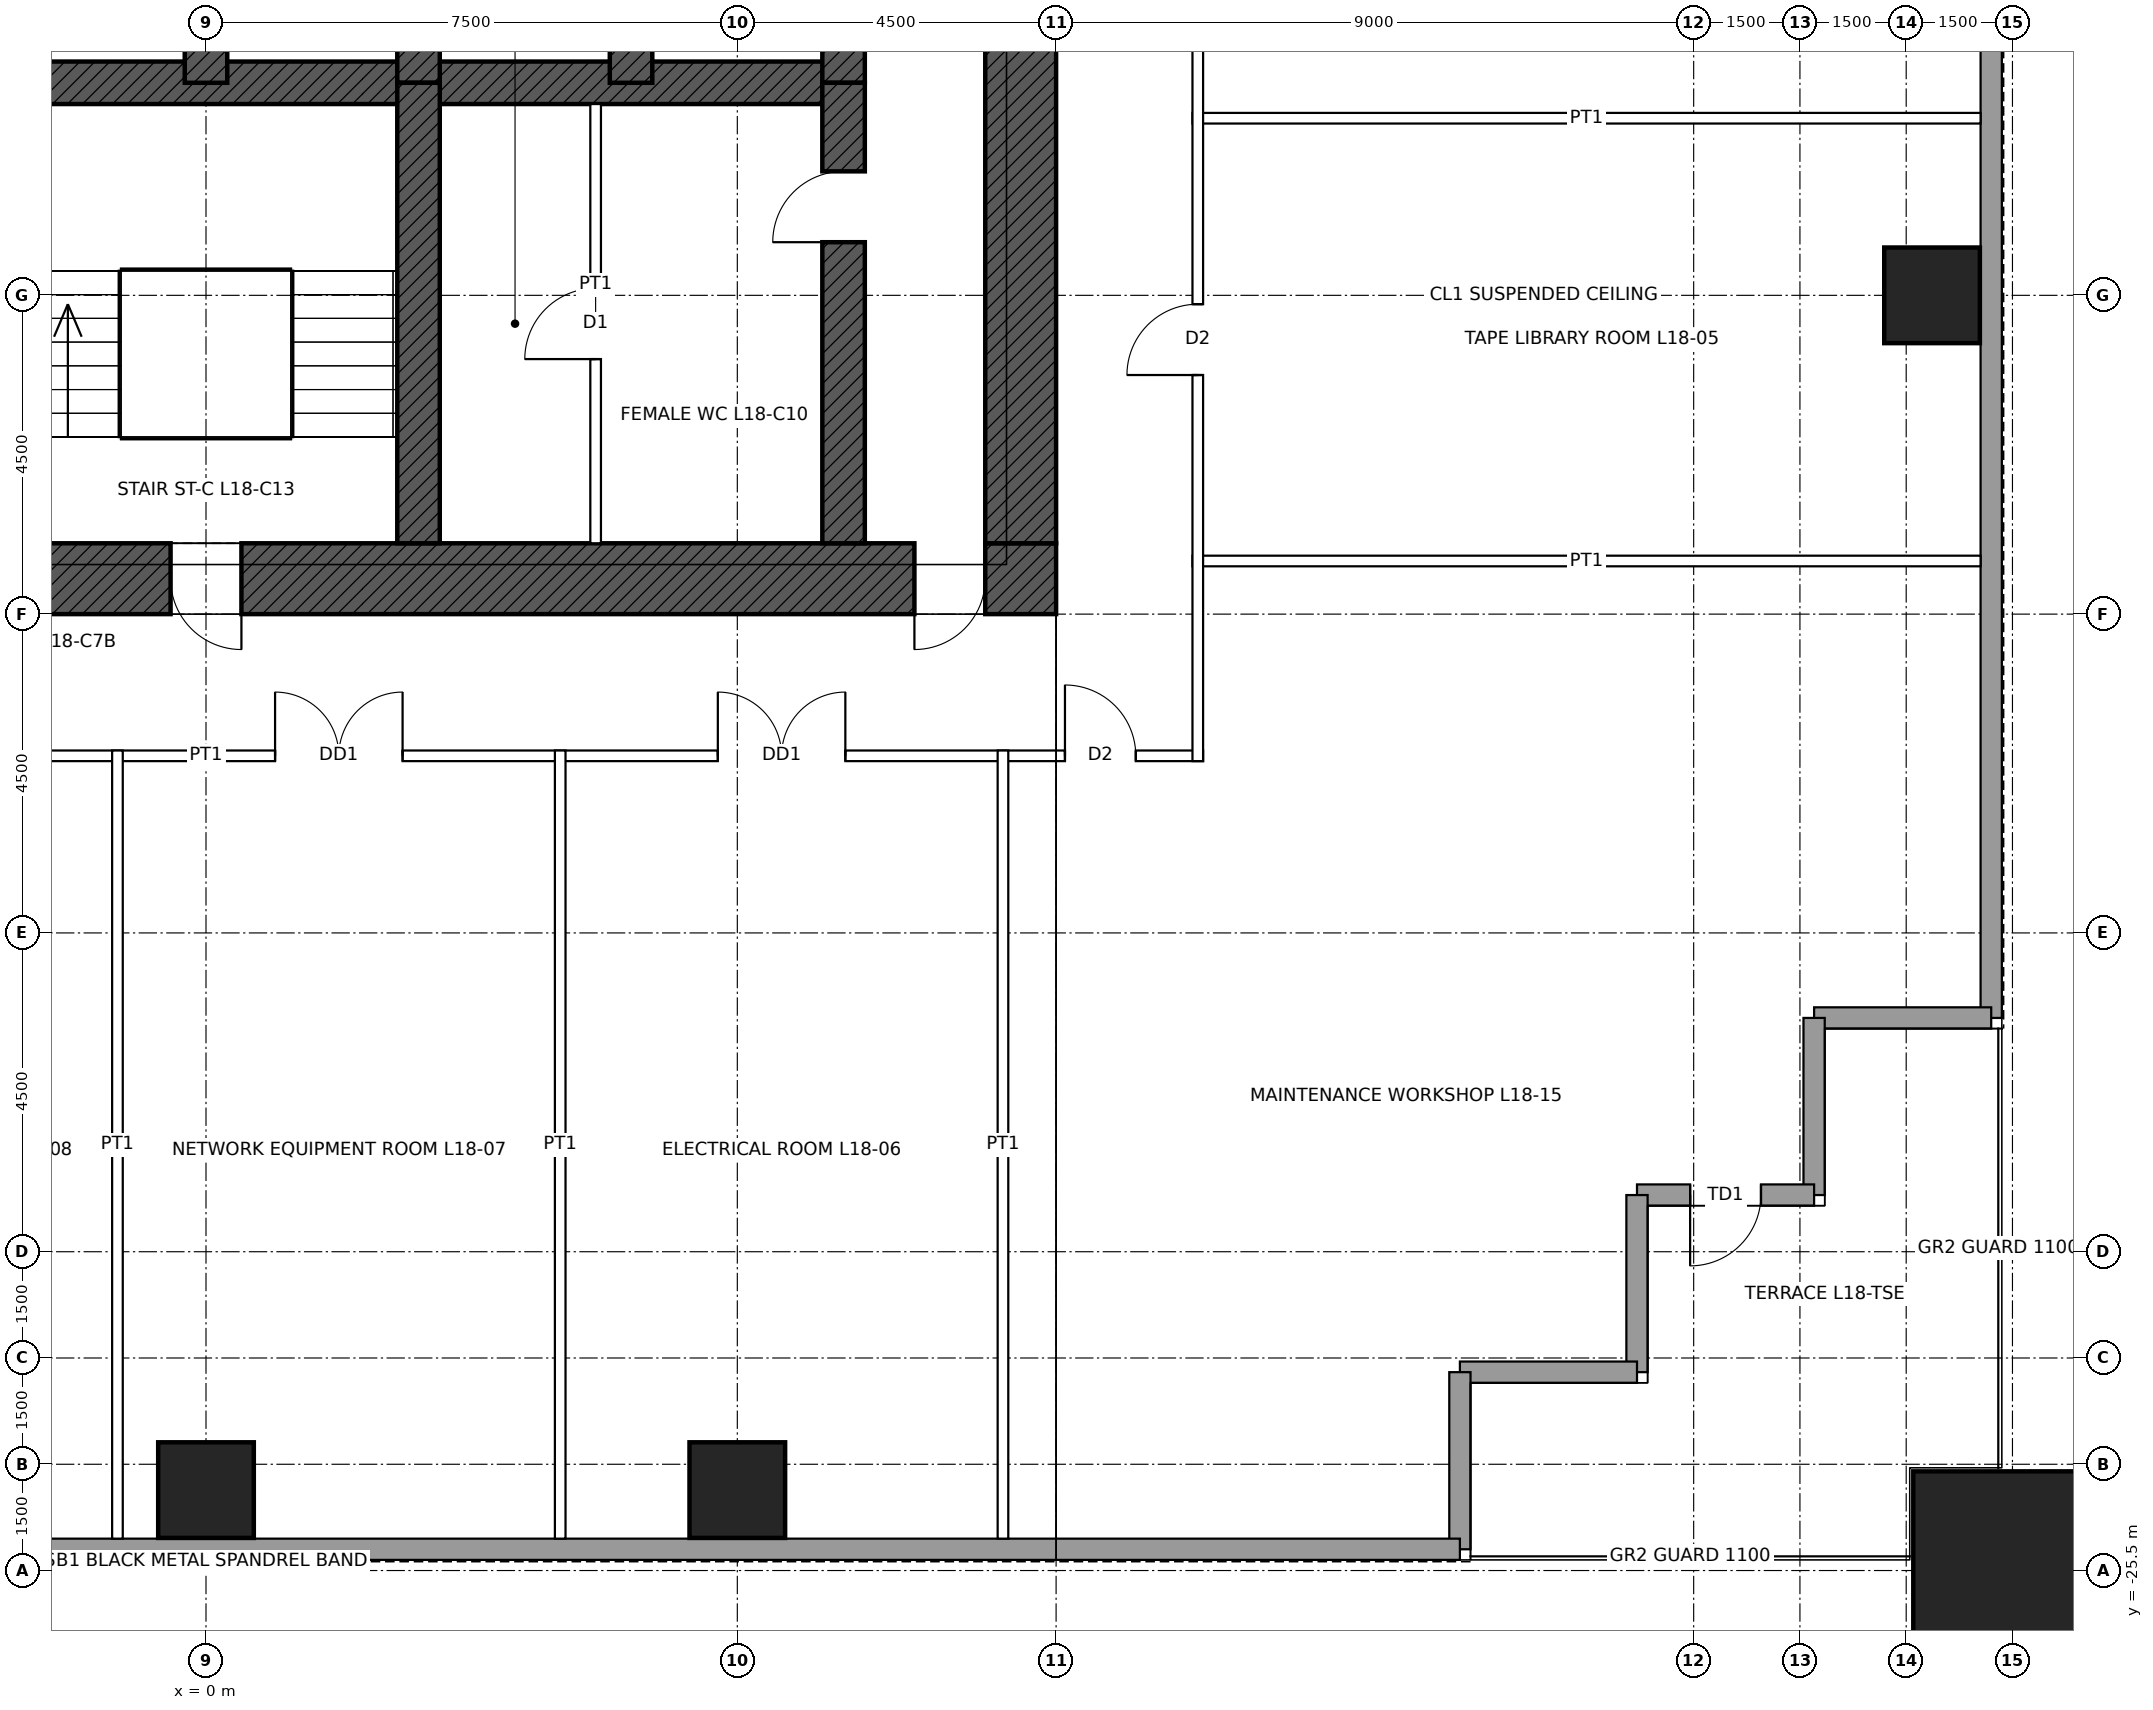
"""IFC4 building model, lengths in metres.
Left out: names, types, materials, properties, quantities, classifications, styles, units other than length and angle.
Written with IfcOpenShell. Run it as: python <this file> out.ifc"""

import sys

from ifc_helpers import new_model, si_unit, direction, frame, frame_2d, origin, origin_2d, place, context, subcontext, project, spatial, rectangle, hollow_rectangle, extrude, element, fill, save


model = new_model("IFC4")
c1 = context("Model", 3, precision=1e-05, world=origin(), true_north=direction((0.0, 1.0)))
c2 = subcontext(c1, "Body", "Model", "MODEL_VIEW")
j1 = project(units=[si_unit("LENGTHUNIT", "METRE"), si_unit("PLANEANGLEUNIT", "RADIAN")], contexts=[c1])
p1 = place(None, origin())
s1 = spatial("IfcSite", under=j1, at=p1, CompositionType="ELEMENT")
p2 = place(p1, origin())
s2 = spatial("IfcBuilding", under=s1, at=p2, CompositionType="ELEMENT")
p3 = place(p2, frame((0.0, 0.0, 93.4)))
s3 = spatial("IfcBuildingStorey", under=s2, at=p3, CompositionType="ELEMENT", Elevation=93.4)
p4 = place(p3, frame((25.5, -25.5, 0.0), z_axis=(0.0, 0.0, 1.0), x_axis=(1.0, 0.0, 0.0)))
e1 = element("IfcColumn", 1, at=p4, inside=s3, PredefinedType="COLUMN", context=c2, shape_type="SweptSolid", body=[
    extrude(hollow_rectangle(XDim=2.8, YDim=2.8, WallThickness=0.14, at=origin_2d()), origin(), (0.0, 0.0, 1.0), 5.0),
])
for number, where, z_axis, x_axis in (
    (2, (24.365, -7.5, 0.0), (0.0, 0.0, 1.0), (1.0, 0.0, 0.0)),
    (3, (7.5, -24.365, 0.0), (0.0, 0.0, 1.0), (1.0, 0.0, 0.0)),
    (4, (0.0, -24.365, 0.0), (0.0, 0.0, 1.0), (1.0, 0.0, 0.0)),
):
    element("IfcColumn", number, at=place(p3, frame(where, z_axis=z_axis, x_axis=x_axis)), inside=s3, PredefinedType="COLUMN", context=c2, shape_type="SweptSolid", body=[
        extrude(hollow_rectangle(XDim=1.35, YDim=1.35, WallThickness=0.1, at=origin_2d()), origin(), (0.0, 0.0, 1.0), 5.0),
    ])
p5 = place(p3, frame((12.0, -11.5, 0.0), z_axis=(0.0, 0.0, 1.0), x_axis=(-1.0, 0.0, 0.0)))
e5 = element("IfcWall", 5, at=p5, inside=s3, PredefinedType="SHEAR", context=c2, shape_type="SweptSolid", body=[
    extrude(rectangle(XDim=24.0, YDim=1.0, at=frame_2d((12.0, 0.0))), origin(), (0.0, 0.0, 1.0), 5.0),
])
p6 = place(p5, frame((11.5, 0.0, 0.0)))
e6 = element("IfcOpeningElement", 6, at=p6, cuts=e5, PredefinedType="OPENING", context=c2, shape_type="SweptSolid", body=[
    extrude(rectangle(XDim=1.0, YDim=2.1, at=frame_2d((0.5, 1.05))), frame((0.0, 0.51, 0.0), z_axis=(0.0, -1.0, 0.0), x_axis=(1.0, 0.0, 0.0)), (0.0, 0.0, 1.0), 1.02),
])
p7 = place(p5, frame((1.0, 0.0, 0.0)))
e7 = element("IfcOpeningElement", 7, at=p7, cuts=e5, PredefinedType="OPENING", context=c2, shape_type="SweptSolid", body=[
    extrude(rectangle(XDim=1.0, YDim=2.4, at=frame_2d((0.5, 1.2))), frame((0.0, 0.51, 0.0), z_axis=(0.0, -1.0, 0.0), x_axis=(1.0, 0.0, 0.0)), (0.0, 0.0, 1.0), 1.02),
])
p8 = place(p3, frame((11.5, 11.0, 0.0), z_axis=(0.0, 0.0, 1.0), x_axis=(0.0, -1.0, 0.0)))
e8 = element("IfcWall", 8, at=p8, inside=s3, PredefinedType="SHEAR", context=c2, shape_type="SweptSolid", body=[
    extrude(rectangle(XDim=22.0, YDim=1.0, at=frame_2d((11.0, 0.0))), origin(), (0.0, 0.0, 1.0), 5.0),
])
p9 = place(p8, frame((10.5, 0.0, 0.0)))
e9 = element("IfcOpeningElement", 9, at=p9, cuts=e8, PredefinedType="OPENING", context=c2, shape_type="SweptSolid", body=[
    extrude(rectangle(XDim=1.0, YDim=2.4, at=frame_2d((0.5, 1.2))), frame((0.0, 0.51, 0.0), z_axis=(0.0, -1.0, 0.0), x_axis=(1.0, 0.0, 0.0)), (0.0, 0.0, 1.0), 1.02),
])
p10 = place(p3, frame((-9.0, -4.5, 0.0), z_axis=(0.0, 0.0, 1.0), x_axis=(1.0, 0.0, 0.0)))
e10 = element("IfcWall", 10, at=p10, inside=s3, PredefinedType="SHEAR", context=c2, shape_type="SweptSolid", body=[
    extrude(rectangle(XDim=18.0, YDim=0.6, at=frame_2d((9.0, 0.0))), origin(), (0.0, 0.0, 1.0), 5.0),
])
for number, where, z_axis, x_axis in (
    (11, (9.0, -4.5, 0.0), (0.0, 0.0, 1.0), (0.0, 1.0, 0.0)),
    (12, (0.0, -4.5, 0.0), (0.0, 0.0, 1.0), (0.0, 1.0, 0.0)),
    (13, (3.0, -4.5, 0.0), (0.0, 0.0, 1.0), (0.0, 1.0, 0.0)),
    (14, (6.0, -4.5, 0.0), (0.0, 0.0, 1.0), (0.0, 1.0, 0.0)),
):
    element("IfcWall", number, at=place(p3, frame(where, z_axis=z_axis, x_axis=x_axis)), inside=s3, PredefinedType="SHEAR", context=c2, shape_type="SweptSolid", body=[
        extrude(rectangle(XDim=3.0, YDim=0.6, at=frame_2d((1.5, 0.0))), origin(), (0.0, 0.0, 1.0), 5.0),
    ])
p11 = place(p3, frame((9.0, -11.0, 0.0), z_axis=(0.0, 0.0, 1.0), x_axis=(0.0, 1.0, 0.0)))
e15 = element("IfcWall", 15, at=p11, inside=s3, PredefinedType="SHEAR", context=c2, shape_type="SweptSolid", body=[
    extrude(rectangle(XDim=6.5, YDim=0.6, at=frame_2d((3.25, 0.0))), origin(), (0.0, 0.0, 1.0), 5.0),
])
p12 = place(p11, frame((4.25, 0.0, 0.0)))
e16 = element("IfcOpeningElement", 16, at=p12, cuts=e15, PredefinedType="OPENING", context=c2, shape_type="SweptSolid", body=[
    extrude(rectangle(XDim=1.0, YDim=2.1, at=frame_2d((0.5, 1.05))), frame((0.0, 0.31, 0.0), z_axis=(0.0, -1.0, 0.0), x_axis=(1.0, 0.0, 0.0)), (0.0, 0.0, 1.0), 0.62),
])
p13 = place(p3, frame((3.0, -11.0, 0.0), z_axis=(0.0, 0.0, 1.0), x_axis=(0.0, 1.0, 0.0)))
e17 = element("IfcWall", 17, at=p13, inside=s3, PredefinedType="SHEAR", context=c2, shape_type="SweptSolid", body=[
    extrude(rectangle(XDim=6.5, YDim=0.6, at=frame_2d((3.25, 0.0))), origin(), (0.0, 0.0, 1.0), 5.0),
])
p14 = place(p3, frame((25.2, 17.7, 0.0), z_axis=(0.0, 0.0, 1.0), x_axis=(0.0, -1.0, 0.0)))
e18 = element("IfcWall", 18, at=p14, inside=s3, PredefinedType="SOLIDWALL", context=c2, shape_type="SweptSolid", body=[
    extrude(rectangle(XDim=35.4, YDim=0.3, at=frame_2d((17.7, 0.0))), origin(), (0.0, 0.0, 1.0), 4.75),
])
for number, where, z_axis, x_axis in (
    (19, (25.2, -17.7, 0.0), (0.0, 0.0, 1.0), (-1.0, 0.0, 0.0)),
    (20, (22.7, -17.7, 0.0), (0.0, 0.0, 1.0), (0.0, -1.0, 0.0)),
):
    element("IfcWall", number, at=place(p3, frame(where, z_axis=z_axis, x_axis=x_axis)), inside=s3, PredefinedType="SOLIDWALL", context=c2, shape_type="SweptSolid", body=[
        extrude(rectangle(XDim=2.5, YDim=0.3, at=frame_2d((1.25, 0.0))), origin(), (0.0, 0.0, 1.0), 4.75),
    ])
p15 = place(p3, frame((22.7, -20.2, 0.0), z_axis=(0.0, 0.0, 1.0), x_axis=(-1.0, 0.0, 0.0)))
e21 = element("IfcWall", 21, at=p15, inside=s3, PredefinedType="SOLIDWALL", context=c2, shape_type="SweptSolid", body=[
    extrude(rectangle(XDim=2.5, YDim=0.3, at=frame_2d((1.25, 0.0))), origin(), (0.0, 0.0, 1.0), 4.75),
])
p16 = place(p15, frame((0.75, 0.0, 0.0)))
e22 = element("IfcOpeningElement", 22, at=p16, cuts=e21, PredefinedType="OPENING", context=c2, shape_type="SweptSolid", body=[
    extrude(rectangle(XDim=1.0, YDim=2.4, at=frame_2d((0.5, 1.2))), frame((0.0, 0.16, 0.0), z_axis=(0.0, -1.0, 0.0), x_axis=(1.0, 0.0, 0.0)), (0.0, 0.0, 1.0), 0.32),
])
for number, where, z_axis, x_axis in (
    (23, (20.2, -20.2, 0.0), (0.0, 0.0, 1.0), (0.0, -1.0, 0.0)),
    (24, (20.2, -22.7, 0.0), (0.0, 0.0, 1.0), (-1.0, 0.0, 0.0)),
    (25, (17.7, -22.7, 0.0), (0.0, 0.0, 1.0), (0.0, -1.0, 0.0)),
):
    element("IfcWall", number, at=place(p3, frame(where, z_axis=z_axis, x_axis=x_axis)), inside=s3, PredefinedType="SOLIDWALL", context=c2, shape_type="SweptSolid", body=[
        extrude(rectangle(XDim=2.5, YDim=0.3, at=frame_2d((1.25, 0.0))), origin(), (0.0, 0.0, 1.0), 4.75),
    ])
p17 = place(p3, frame((17.7, -25.2, 0.0), z_axis=(0.0, 0.0, 1.0), x_axis=(-1.0, 0.0, 0.0)))
e26 = element("IfcWall", 26, at=p17, inside=s3, PredefinedType="SOLIDWALL", context=c2, shape_type="SweptSolid", body=[
    extrude(rectangle(XDim=35.4, YDim=0.3, at=frame_2d((17.7, 0.0))), origin(), (0.0, 0.0, 1.0), 4.75),
])
p18 = place(p3, frame((-14.075, -14.0, 0.0), z_axis=(0.0, 0.0, 1.0), x_axis=(1.0, 0.0, 0.0)))
e27 = element("IfcWall", 27, at=p18, inside=s3, PredefinedType="PARTITIONING", context=c2, shape_type="SweptSolid", body=[
    extrude(rectangle(XDim=28.15, YDim=0.15, at=frame_2d((14.075, 0.0))), origin(), (0.0, 0.0, 1.0), 4.75),
])
p19 = place(p18, frame((21.3, 0.0, 0.0)))
e28 = element("IfcOpeningElement", 28, at=p19, cuts=e27, PredefinedType="OPENING", context=c2, shape_type="SweptSolid", body=[
    extrude(rectangle(XDim=1.8, YDim=2.4, at=frame_2d((0.9, 1.2))), frame((0.0, 0.085, 0.0), z_axis=(0.0, -1.0, 0.0), x_axis=(1.0, 0.0, 0.0)), (0.0, 0.0, 1.0), 0.17),
])
p20 = place(p18, frame((15.05, 0.0, 0.0)))
e29 = element("IfcOpeningElement", 29, at=p20, cuts=e27, PredefinedType="OPENING", context=c2, shape_type="SweptSolid", body=[
    extrude(rectangle(XDim=1.8, YDim=2.4, at=frame_2d((0.9, 1.2))), frame((0.0, 0.085, 0.0), z_axis=(0.0, -1.0, 0.0), x_axis=(1.0, 0.0, 0.0)), (0.0, 0.0, 1.0), 0.17),
])
p21 = place(p18, frame((9.825, 0.0, 0.0)))
e30 = element("IfcOpeningElement", 30, at=p21, cuts=e27, PredefinedType="OPENING", context=c2, shape_type="SweptSolid", body=[
    extrude(rectangle(XDim=1.0, YDim=2.1, at=frame_2d((0.5, 1.05))), frame((0.0, 0.085, 0.0), z_axis=(0.0, -1.0, 0.0), x_axis=(1.0, 0.0, 0.0)), (0.0, 0.0, 1.0), 0.17),
])
p22 = place(p18, frame((4.825, 0.0, 0.0)))
e31 = element("IfcOpeningElement", 31, at=p22, cuts=e27, PredefinedType="OPENING", context=c2, shape_type="SweptSolid", body=[
    extrude(rectangle(XDim=1.0, YDim=2.1, at=frame_2d((0.5, 1.05))), frame((0.0, 0.085, 0.0), z_axis=(0.0, -1.0, 0.0), x_axis=(1.0, 0.0, 0.0)), (0.0, 0.0, 1.0), 0.17),
])
p23 = place(p18, frame((26.2, 0.0, 0.0)))
e32 = element("IfcOpeningElement", 32, at=p23, cuts=e27, PredefinedType="OPENING", context=c2, shape_type="SweptSolid", body=[
    extrude(rectangle(XDim=1.0, YDim=2.1, at=frame_2d((0.5, 1.05))), frame((0.0, 0.085, 0.0), z_axis=(0.0, -1.0, 0.0), x_axis=(1.0, 0.0, 0.0)), (0.0, 0.0, 1.0), 0.17),
])
p24 = place(p18, frame((0.95, 0.0, 0.0)))
e33 = element("IfcOpeningElement", 33, at=p24, cuts=e27, PredefinedType="OPENING", context=c2, shape_type="SweptSolid", body=[
    extrude(rectangle(XDim=1.0, YDim=2.1, at=frame_2d((0.5, 1.05))), frame((0.0, 0.085, 0.0), z_axis=(0.0, -1.0, 0.0), x_axis=(1.0, 0.0, 0.0)), (0.0, 0.0, 1.0), 0.17),
])
p25 = place(p3, frame((13.925, -11.25, 0.0), z_axis=(0.0, 0.0, 1.0), x_axis=(1.0, 0.0, 0.0)))
e34 = element("IfcWall", 34, at=p25, inside=s3, PredefinedType="PARTITIONING", context=c2, shape_type="SweptSolid", body=[
    extrude(rectangle(XDim=11.125, YDim=0.15, at=frame_2d((5.562, 0.0))), origin(), (0.0, 0.0, 1.0), 3.823),
])
for number, where, z_axis, x_axis in (
    (35, (13.925, -5.0, 0.0), (0.0, 0.0, 1.0), (1.0, 0.0, 0.0)),
    (36, (-1.25, -25.05, 0.0), (0.0, 0.0, 1.0), (0.0, 1.0, 0.0)),
    (37, (5.0, -25.05, 0.0), (0.0, 0.0, 1.0), (0.0, 1.0, 0.0)),
):
    element("IfcWall", number, at=place(p3, frame(where, z_axis=z_axis, x_axis=x_axis)), inside=s3, PredefinedType="PARTITIONING", context=c2, shape_type="SweptSolid", body=[
        extrude(rectangle(XDim=11.125, YDim=0.15, at=frame_2d((5.562, 0.0))), origin(), (0.0, 0.0, 1.0), 4.75),
    ])
p26 = place(p3, frame((11.25, -25.05, 0.0), z_axis=(0.0, 0.0, 1.0), x_axis=(0.0, 1.0, 0.0)))
e38 = element("IfcWall", 38, at=p26, inside=s3, PredefinedType="PARTITIONING", context=c2, shape_type="SweptSolid", body=[
    extrude(rectangle(XDim=11.125, YDim=0.15, at=frame_2d((5.562, 0.0))), origin(), (0.0, 0.0, 1.0), 3.823),
])
p27 = place(p3, frame((14.0, -14.075, 0.0), z_axis=(0.0, 0.0, 1.0), x_axis=(0.0, 1.0, 0.0)))
e39 = element("IfcWall", 39, at=p27, inside=s3, PredefinedType="PARTITIONING", context=c2, shape_type="SweptSolid", body=[
    extrude(rectangle(XDim=28.15, YDim=0.15, at=frame_2d((14.075, 0.0))), origin(), (0.0, 0.0, 1.0), 4.75),
])
p28 = place(p27, frame((16.3, 0.0, 0.0)))
e40 = element("IfcOpeningElement", 40, at=p28, cuts=e39, PredefinedType="OPENING", context=c2, shape_type="SweptSolid", body=[
    extrude(rectangle(XDim=1.8, YDim=2.4, at=frame_2d((0.9, 1.2))), frame((0.0, 0.085, 0.0), z_axis=(0.0, -1.0, 0.0), x_axis=(1.0, 0.0, 0.0)), (0.0, 0.0, 1.0), 0.17),
])
p29 = place(p27, frame((5.45, 0.0, 0.0)))
e41 = element("IfcOpeningElement", 41, at=p29, cuts=e39, PredefinedType="OPENING", context=c2, shape_type="SweptSolid", body=[
    extrude(rectangle(XDim=1.0, YDim=2.1, at=frame_2d((0.5, 1.05))), frame((0.0, 0.085, 0.0), z_axis=(0.0, -1.0, 0.0), x_axis=(1.0, 0.0, 0.0)), (0.0, 0.0, 1.0), 0.17),
])
p30 = place(p3, frame((5.5, -11.0, 0.0), z_axis=(0.0, 0.0, 1.0), x_axis=(0.0, 1.0, 0.0)))
e42 = element("IfcWall", 42, at=p30, inside=s3, PredefinedType="PARTITIONING", context=c2, shape_type="SweptSolid", body=[
    extrude(rectangle(XDim=6.2, YDim=0.15, at=frame_2d((3.1, 0.0))), origin(), (0.0, 0.0, 1.0), 4.75),
])
p31 = place(p30, frame((2.6, 0.0, 0.0)))
e43 = element("IfcOpeningElement", 43, at=p31, cuts=e42, PredefinedType="OPENING", context=c2, shape_type="SweptSolid", body=[
    extrude(rectangle(XDim=1.0, YDim=2.1, at=frame_2d((0.5, 1.05))), frame((0.0, 0.085, 0.0), z_axis=(0.0, -1.0, 0.0), x_axis=(1.0, 0.0, 0.0)), (0.0, 0.0, 1.0), 0.17),
])
p32 = place(p16, origin())
e44 = element("IfcDoor", 44, at=p32, inside=s3, OperationType="SINGLE_SWING_RIGHT", PredefinedType="DOOR", context=c2, shape_type="SweptSolid", body=[
    extrude(rectangle(XDim=1.0, YDim=2.4, at=frame_2d((0.5, 1.2))), frame((0.0, 0.025, 0.0), z_axis=(0.0, -1.0, 0.0), x_axis=(1.0, 0.0, 0.0)), (0.0, 0.0, 1.0), 0.05),
])
fill(e22, e44)
p33 = place(p6, origin())
e45 = element("IfcDoor", 45, at=p33, inside=s3, OperationType="SINGLE_SWING_LEFT", PredefinedType="DOOR", context=c2, shape_type="SweptSolid", body=[
    extrude(rectangle(XDim=1.0, YDim=2.1, at=frame_2d((0.5, 1.05))), frame((0.0, 0.485, 0.0), z_axis=(0.0, -1.0, 0.0), x_axis=(1.0, 0.0, 0.0)), (0.0, 0.0, 1.0), 0.05),
])
fill(e6, e45)
p34 = place(p7, origin())
e46 = element("IfcDoor", 46, at=p34, inside=s3, OperationType="SINGLE_SWING_RIGHT", PredefinedType="DOOR", context=c2, shape_type="SweptSolid", body=[
    extrude(rectangle(XDim=1.0, YDim=2.4, at=frame_2d((0.5, 1.2))), frame((0.0, 0.485, 0.0), z_axis=(0.0, -1.0, 0.0), x_axis=(1.0, 0.0, 0.0)), (0.0, 0.0, 1.0), 0.05),
])
fill(e7, e46)
p35 = place(p12, origin())
e47 = element("IfcDoor", 47, at=p35, inside=s3, OperationType="SINGLE_SWING_LEFT", PredefinedType="DOOR", context=c2, shape_type="SweptSolid", body=[
    extrude(rectangle(XDim=1.0, YDim=2.1, at=frame_2d((0.5, 1.05))), frame((0.0, 0.025, 0.0), z_axis=(0.0, -1.0, 0.0), x_axis=(1.0, 0.0, 0.0)), (0.0, 0.0, 1.0), 0.05),
])
fill(e16, e47)
p36 = place(p31, origin())
e48 = element("IfcDoor", 48, at=p36, inside=s3, OperationType="SINGLE_SWING_LEFT", PredefinedType="DOOR", context=c2, shape_type="SweptSolid", body=[
    extrude(rectangle(XDim=1.0, YDim=2.1, at=frame_2d((0.5, 1.05))), frame((0.0, 0.025, 0.0), z_axis=(0.0, -1.0, 0.0), x_axis=(1.0, 0.0, 0.0)), (0.0, 0.0, 1.0), 0.05),
])
fill(e43, e48)
p37 = place(p29, origin())
e49 = element("IfcDoor", 49, at=p37, inside=s3, OperationType="SINGLE_SWING_LEFT", PredefinedType="DOOR", context=c2, shape_type="SweptSolid", body=[
    extrude(rectangle(XDim=1.0, YDim=2.1, at=frame_2d((0.5, 1.05))), frame((0.0, 0.025, 0.0), z_axis=(0.0, -1.0, 0.0), x_axis=(1.0, 0.0, 0.0)), (0.0, 0.0, 1.0), 0.05),
])
fill(e41, e49)
p38 = place(p19, origin())
e50 = element("IfcDoor", 50, at=p38, inside=s3, OperationType="DOUBLE_DOOR_SINGLE_SWING", PredefinedType="DOOR", context=c2, shape_type="SweptSolid", body=[
    extrude(rectangle(XDim=1.8, YDim=2.4, at=frame_2d((0.9, 1.2))), frame((0.0, 0.025, 0.0), z_axis=(0.0, -1.0, 0.0), x_axis=(1.0, 0.0, 0.0)), (0.0, 0.0, 1.0), 0.05),
])
fill(e28, e50)
p39 = place(p20, origin())
e51 = element("IfcDoor", 51, at=p39, inside=s3, OperationType="DOUBLE_DOOR_SINGLE_SWING", PredefinedType="DOOR", context=c2, shape_type="SweptSolid", body=[
    extrude(rectangle(XDim=1.8, YDim=2.4, at=frame_2d((0.9, 1.2))), frame((0.0, 0.025, 0.0), z_axis=(0.0, -1.0, 0.0), x_axis=(1.0, 0.0, 0.0)), (0.0, 0.0, 1.0), 0.05),
])
fill(e29, e51)
p40 = place(p23, origin())
e52 = element("IfcDoor", 52, at=p40, inside=s3, OperationType="SINGLE_SWING_LEFT", PredefinedType="DOOR", context=c2, shape_type="SweptSolid", body=[
    extrude(rectangle(XDim=1.0, YDim=2.1, at=frame_2d((0.5, 1.05))), frame((0.0, 0.025, 0.0), z_axis=(0.0, -1.0, 0.0), x_axis=(1.0, 0.0, 0.0)), (0.0, 0.0, 1.0), 0.05),
])
fill(e32, e52)
save(model, sys.argv[1])
